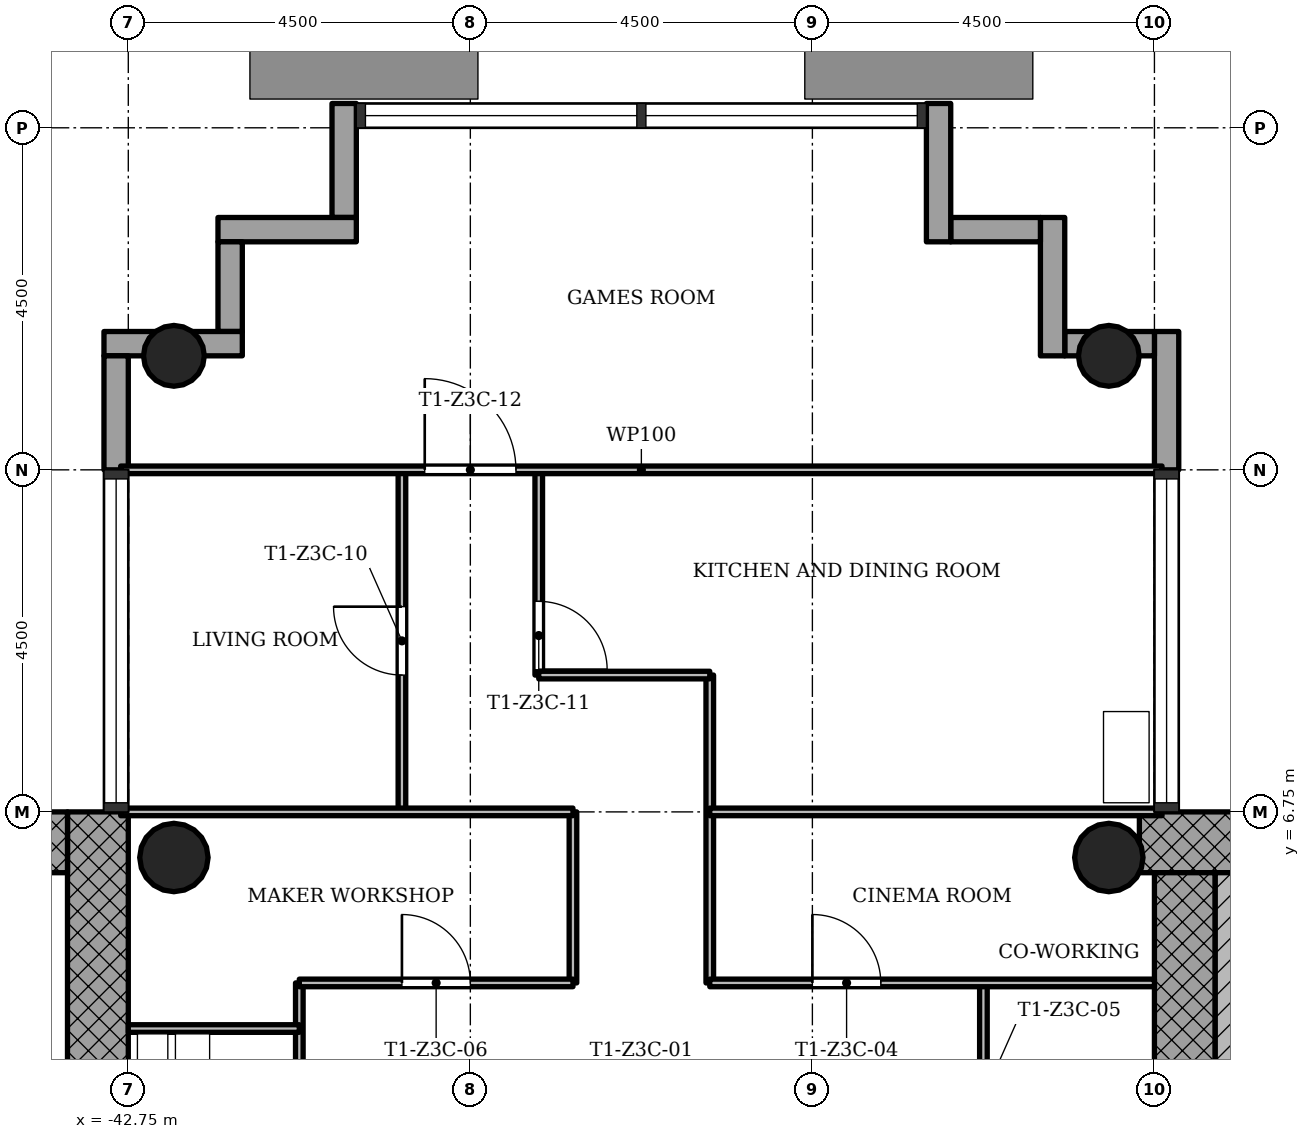
"""IFC4 building model, lengths in metres.
Left out: names, types, materials, properties, quantities, classifications, styles, units other than length and angle.
Written with IfcOpenShell. Run it as: python <this file> out.ifc"""

import sys

from ifc_helpers import new_model, si_unit, direction, frame, frame_2d, origin, origin_2d, place, context, subcontext, project, spatial, rectangle, hollow_circle, extrude, element, fill, save


model = new_model("IFC4")
c1 = context("Model", 3, precision=1e-05, world=origin(), true_north=direction((0.0, 1.0)))
c2 = subcontext(c1, "Body", "Model", "MODEL_VIEW")
j1 = project(units=[si_unit("LENGTHUNIT", "METRE"), si_unit("PLANEANGLEUNIT", "RADIAN")], contexts=[c1])
p1 = place(None, origin())
s1 = spatial("IfcSite", under=j1, at=p1, CompositionType="ELEMENT")
p2 = place(p1, origin())
s2 = spatial("IfcBuilding", under=s1, at=p2, CompositionType="ELEMENT")
p3 = place(p2, frame((0.0, 0.0, 157.5)))
s3 = spatial("IfcBuildingStorey", under=s2, at=p3, CompositionType="ELEMENT", Elevation=157.5)
p4 = place(p3, frame((-20.652, 6.35, 0.0), z_axis=(0.0, 0.0, 1.0), x_axis=(-1.0, 0.0, 0.0)))
e1 = element("IfcWall", 1, at=p4, inside=s3, PredefinedType="SHEAR", context=c2, shape_type="SweptSolid", body=[
    extrude(rectangle(XDim=8.796, YDim=0.8, at=frame_2d((4.398, 0.0))), origin(), (0.0, 0.0, 1.0), 3.4),
])
p5 = place(p3, frame((-28.85, 5.95, 0.0), z_axis=(0.0, 0.0, 1.0), x_axis=(0.0, -1.0, 0.0)))
e2 = element("IfcWall", 2, at=p5, inside=s3, PredefinedType="SHEAR", context=c2, shape_type="SweptSolid", body=[
    extrude(rectangle(XDim=12.7, YDim=0.8, at=frame_2d((6.35, 0.0))), origin(), (0.0, 0.0, 1.0), 3.4),
])
p6 = place(p5, frame((5.05, 0.0, 0.0)))
e3 = element("IfcOpeningElement", 3, at=p6, cuts=e2, PredefinedType="OPENING", context=c2, shape_type="SweptSolid", body=[
    extrude(rectangle(XDim=1.8, YDim=2.1, at=frame_2d((0.9, 1.05))), frame((0.0, 0.41, 0.0), z_axis=(0.0, -1.0, 0.0), x_axis=(1.0, 0.0, 0.0)), (0.0, 0.0, 1.0), 0.82),
])
p7 = place(p3, frame((-43.15, -5.95, 0.0), z_axis=(0.0, 0.0, 1.0), x_axis=(0.0, 1.0, 0.0)))
e4 = element("IfcWall", 4, at=p7, inside=s3, PredefinedType="SHEAR", context=c2, shape_type="SweptSolid", body=[
    extrude(rectangle(XDim=12.7, YDim=0.8, at=frame_2d((6.35, 0.0))), origin(), (0.0, 0.0, 1.0), 3.4),
])
p8 = place(p7, frame((5.05, 0.0, 0.0)))
e5 = element("IfcOpeningElement", 5, at=p8, cuts=e4, PredefinedType="OPENING", context=c2, shape_type="SweptSolid", body=[
    extrude(rectangle(XDim=1.8, YDim=2.1, at=frame_2d((0.9, 1.05))), frame((0.0, 0.41, 0.0), z_axis=(0.0, -1.0, 0.0), x_axis=(1.0, 0.0, 0.0)), (0.0, 0.0, 1.0), 0.82),
])
p9 = place(p3, frame((-43.55, 6.35, 0.0), z_axis=(0.0, 0.0, 1.0), x_axis=(-1.0, 0.0, 0.0)))
e6 = element("IfcWall", 6, at=p9, inside=s3, PredefinedType="SHEAR", context=c2, shape_type="SweptSolid", body=[
    extrude(rectangle(XDim=8.2, YDim=0.8, at=frame_2d((4.1, 0.0))), origin(), (0.0, 0.0, 1.0), 3.4),
])
for number, where, z_axis, x_axis in (
    (7, (-29.85, 12.75, 0.0), (0.0, 0.0, 1.0), (1.0, 0.0, 0.0)),
    (8, (-42.15, 12.75, 0.0), (0.0, 0.0, 1.0), (1.0, 0.0, 0.0)),
):
    element("IfcColumn", number, at=place(p3, frame(where, z_axis=z_axis, x_axis=x_axis)), inside=s3, PredefinedType="COLUMN", context=c2, shape_type="SweptSolid", body=[
        extrude(hollow_circle(Radius=0.4, WallThickness=0.028, at=origin_2d()), origin(), (0.0, 0.0, 1.0), 3.4),
    ])
for number, where, z_axis, x_axis in (
    (9, (-29.85, 6.15, 0.0), (0.0, 0.0, 1.0), (1.0, 0.0, 0.0)),
    (10, (-42.15, 6.15, 0.0), (0.0, 0.0, 1.0), (1.0, 0.0, 0.0)),
):
    element("IfcColumn", number, at=place(p3, frame(where, z_axis=z_axis, x_axis=x_axis)), inside=s3, PredefinedType="COLUMN", context=c2, shape_type="SweptSolid", body=[
        extrude(hollow_circle(Radius=0.45, WallThickness=0.032, at=origin_2d()), origin(), (0.0, 0.0, 1.0), 3.4),
    ])
p10 = place(p3, frame((-29.09, 11.25, -0.3), z_axis=(0.0, 0.0, 1.0), x_axis=(0.0, 1.0, 0.0)))
e11 = element("IfcWall", 11, at=p10, inside=s3, PredefinedType="STANDARD", context=c2, shape_type="SweptSolid", body=[
    extrude(rectangle(XDim=1.82, YDim=0.32, at=frame_2d((0.91, 0.0))), origin(), (0.0, 0.0, 1.0), 3.4),
])
p11 = place(p3, frame((-29.25, 12.91, -0.3), z_axis=(0.0, 0.0, 1.0), x_axis=(-1.0, 0.0, 0.0)))
e12 = element("IfcWall", 12, at=p11, inside=s3, PredefinedType="STANDARD", context=c2, shape_type="SweptSolid", body=[
    extrude(rectangle(XDim=1.18, YDim=0.32, at=frame_2d((0.59, 0.0))), origin(), (0.0, 0.0, 1.0), 3.4),
])
p12 = place(p3, frame((-30.59, 12.75, -0.3), z_axis=(0.0, 0.0, 1.0), x_axis=(0.0, 1.0, 0.0)))
e13 = element("IfcWall", 13, at=p12, inside=s3, PredefinedType="STANDARD", context=c2, shape_type="SweptSolid", body=[
    extrude(rectangle(XDim=1.82, YDim=0.32, at=frame_2d((0.91, 0.0))), origin(), (0.0, 0.0, 1.0), 3.4),
])
p13 = place(p3, frame((-30.75, 14.41, -0.3), z_axis=(0.0, 0.0, 1.0), x_axis=(-1.0, 0.0, 0.0)))
e14 = element("IfcWall", 14, at=p13, inside=s3, PredefinedType="STANDARD", context=c2, shape_type="SweptSolid", body=[
    extrude(rectangle(XDim=1.18, YDim=0.32, at=frame_2d((0.59, 0.0))), origin(), (0.0, 0.0, 1.0), 3.4),
])
p14 = place(p3, frame((-32.09, 14.25, -0.3), z_axis=(0.0, 0.0, 1.0), x_axis=(0.0, 1.0, 0.0)))
e15 = element("IfcWall", 15, at=p14, inside=s3, PredefinedType="STANDARD", context=c2, shape_type="SweptSolid", body=[
    extrude(rectangle(XDim=1.82, YDim=0.32, at=frame_2d((0.91, 0.0))), origin(), (0.0, 0.0, 1.0), 3.4),
])
p15 = place(p3, frame((-39.91, 16.07, -0.3), z_axis=(0.0, 0.0, 1.0), x_axis=(0.0, -1.0, 0.0)))
e16 = element("IfcWall", 16, at=p15, inside=s3, PredefinedType="STANDARD", context=c2, shape_type="SweptSolid", body=[
    extrude(rectangle(XDim=1.5, YDim=0.32, at=frame_2d((0.75, 0.0))), origin(), (0.0, 0.0, 1.0), 3.4),
])
p16 = place(p3, frame((-39.75, 14.41, -0.3), z_axis=(0.0, 0.0, 1.0), x_axis=(-1.0, 0.0, 0.0)))
e17 = element("IfcWall", 17, at=p16, inside=s3, PredefinedType="STANDARD", context=c2, shape_type="SweptSolid", body=[
    extrude(rectangle(XDim=1.82, YDim=0.32, at=frame_2d((0.91, 0.0))), origin(), (0.0, 0.0, 1.0), 3.4),
])
p17 = place(p3, frame((-41.41, 14.25, -0.3), z_axis=(0.0, 0.0, 1.0), x_axis=(0.0, -1.0, 0.0)))
e18 = element("IfcWall", 18, at=p17, inside=s3, PredefinedType="STANDARD", context=c2, shape_type="SweptSolid", body=[
    extrude(rectangle(XDim=1.18, YDim=0.32, at=frame_2d((0.59, 0.0))), origin(), (0.0, 0.0, 1.0), 3.4),
])
p18 = place(p3, frame((-41.25, 12.91, -0.3), z_axis=(0.0, 0.0, 1.0), x_axis=(-1.0, 0.0, 0.0)))
e19 = element("IfcWall", 19, at=p18, inside=s3, PredefinedType="STANDARD", context=c2, shape_type="SweptSolid", body=[
    extrude(rectangle(XDim=1.82, YDim=0.32, at=frame_2d((0.91, 0.0))), origin(), (0.0, 0.0, 1.0), 3.4),
])
p19 = place(p3, frame((-42.91, 12.75, -0.3), z_axis=(0.0, 0.0, 1.0), x_axis=(0.0, -1.0, 0.0)))
e20 = element("IfcWall", 20, at=p19, inside=s3, PredefinedType="STANDARD", context=c2, shape_type="SweptSolid", body=[
    extrude(rectangle(XDim=1.5, YDim=0.32, at=frame_2d((0.75, 0.0))), origin(), (0.0, 0.0, 1.0), 3.4),
])
p20 = place(p3, frame((-40.5, 1.5, 0.0), z_axis=(0.0, 0.0, 1.0), x_axis=(0.0, 1.0, 0.0)))
e21 = element("IfcWall", 21, at=p20, inside=s3, PredefinedType="PARTITIONING", context=c2, shape_type="SweptSolid", body=[
    extrude(rectangle(XDim=3.0, YDim=0.1, at=frame_2d((1.5, 0.0))), origin(), (0.0, 0.0, 1.0), 3.0),
])
p21 = place(p3, frame((-39.15, 6.75, 0.0), z_axis=(0.0, 0.0, 1.0), x_axis=(0.0, 1.0, 0.0)))
e22 = element("IfcWall", 22, at=p21, inside=s3, PredefinedType="PARTITIONING", context=c2, shape_type="SweptSolid", body=[
    extrude(rectangle(XDim=4.5, YDim=0.1, at=frame_2d((2.25, 0.0))), origin(), (0.0, 0.0, 1.0), 3.0),
])
p22 = place(p21, frame((1.8, 0.0, 0.0)))
e23 = element("IfcOpeningElement", 23, at=p22, cuts=e22, PredefinedType="OPENING", context=c2, shape_type="SweptSolid", body=[
    extrude(rectangle(XDim=0.9, YDim=2.1, at=frame_2d((0.45, 1.05))), frame((0.0, 0.06, 0.0), z_axis=(0.0, -1.0, 0.0), x_axis=(1.0, 0.0, 0.0)), (0.0, 0.0, 1.0), 0.12),
])
p23 = place(p3, frame((-37.35, 8.55, 0.0), z_axis=(0.0, 0.0, 1.0), x_axis=(0.0, 1.0, 0.0)))
e24 = element("IfcWall", 24, at=p23, inside=s3, PredefinedType="PARTITIONING", context=c2, shape_type="SweptSolid", body=[
    extrude(rectangle(XDim=2.7, YDim=0.1, at=frame_2d((1.35, 0.0))), origin(), (0.0, 0.0, 1.0), 3.0),
])
p24 = place(p23, frame((0.07, 0.0, 0.0)))
e25 = element("IfcOpeningElement", 25, at=p24, cuts=e24, PredefinedType="OPENING", context=c2, shape_type="SweptSolid", body=[
    extrude(rectangle(XDim=0.9, YDim=2.1, at=frame_2d((0.45, 1.05))), frame((0.0, 0.06, 0.0), z_axis=(0.0, -1.0, 0.0), x_axis=(1.0, 0.0, 0.0)), (0.0, 0.0, 1.0), 0.12),
])
p25 = place(p3, frame((-36.9, 4.5, 0.0), z_axis=(0.0, 0.0, 1.0), x_axis=(0.0, 1.0, 0.0)))
e26 = element("IfcWall", 26, at=p25, inside=s3, PredefinedType="PARTITIONING", context=c2, shape_type="SweptSolid", body=[
    extrude(rectangle(XDim=2.25, YDim=0.1, at=frame_2d((1.125, 0.0))), origin(), (0.0, 0.0, 1.0), 3.0),
])
p26 = place(p3, frame((-35.1, 4.5, 0.0), z_axis=(0.0, 0.0, 1.0), x_axis=(0.0, 1.0, 0.0)))
e27 = element("IfcWall", 27, at=p26, inside=s3, PredefinedType="PARTITIONING", context=c2, shape_type="SweptSolid", body=[
    extrude(rectangle(XDim=4.05, YDim=0.1, at=frame_2d((2.025, 0.0))), origin(), (0.0, 0.0, 1.0), 3.0),
])
p27 = place(p3, frame((-31.5, 1.5, 0.0), z_axis=(0.0, 0.0, 1.0), x_axis=(0.0, 1.0, 0.0)))
e28 = element("IfcWall", 28, at=p27, inside=s3, PredefinedType="PARTITIONING", context=c2, shape_type="SweptSolid", body=[
    extrude(rectangle(XDim=3.0, YDim=0.1, at=frame_2d((1.5, 0.0))), origin(), (0.0, 0.0, 1.0), 3.0),
])
p28 = place(p27, frame((1.05, 0.0, 0.0)))
e29 = element("IfcOpeningElement", 29, at=p28, cuts=e28, PredefinedType="OPENING", context=c2, shape_type="SweptSolid", body=[
    extrude(rectangle(XDim=0.9, YDim=2.1, at=frame_2d((0.45, 1.05))), frame((0.0, 0.06, 0.0), z_axis=(0.0, -1.0, 0.0), x_axis=(1.0, 0.0, 0.0)), (0.0, 0.0, 1.0), 0.12),
])
p29 = place(p3, frame((-42.75, 3.9, 0.0), z_axis=(0.0, 0.0, 1.0), x_axis=(1.0, 0.0, 0.0)))
e30 = element("IfcWall", 30, at=p29, inside=s3, PredefinedType="PARTITIONING", context=c2, shape_type="SweptSolid", body=[
    extrude(rectangle(XDim=2.25, YDim=0.1, at=frame_2d((1.125, 0.0))), origin(), (0.0, 0.0, 1.0), 3.0),
])
p30 = place(p3, frame((-40.5, 4.5, 0.0), z_axis=(0.0, 0.0, 1.0), x_axis=(1.0, 0.0, 0.0)))
e31 = element("IfcWall", 31, at=p30, inside=s3, PredefinedType="PARTITIONING", context=c2, shape_type="SweptSolid", body=[
    extrude(rectangle(XDim=3.6, YDim=0.1, at=frame_2d((1.8, 0.0))), origin(), (0.0, 0.0, 1.0), 3.0),
])
p31 = place(p30, frame((1.35, 0.0, 0.0)))
e32 = element("IfcOpeningElement", 32, at=p31, cuts=e31, PredefinedType="OPENING", context=c2, shape_type="SweptSolid", body=[
    extrude(rectangle(XDim=0.9, YDim=2.1, at=frame_2d((0.45, 1.05))), frame((0.0, 0.06, 0.0), z_axis=(0.0, -1.0, 0.0), x_axis=(1.0, 0.0, 0.0)), (0.0, 0.0, 1.0), 0.12),
])
p32 = place(p3, frame((-35.1, 4.5, 0.0), z_axis=(0.0, 0.0, 1.0), x_axis=(1.0, 0.0, 0.0)))
e33 = element("IfcWall", 33, at=p32, inside=s3, PredefinedType="PARTITIONING", context=c2, shape_type="SweptSolid", body=[
    extrude(rectangle(XDim=5.85, YDim=0.1, at=frame_2d((2.925, 0.0))), origin(), (0.0, 0.0, 1.0), 3.0),
])
p33 = place(p32, frame((1.35, 0.0, 0.0)))
e34 = element("IfcOpeningElement", 34, at=p33, cuts=e33, PredefinedType="OPENING", context=c2, shape_type="SweptSolid", body=[
    extrude(rectangle(XDim=0.9, YDim=2.1, at=frame_2d((0.45, 1.05))), frame((0.0, 0.06, 0.0), z_axis=(0.0, -1.0, 0.0), x_axis=(1.0, 0.0, 0.0)), (0.0, 0.0, 1.0), 0.12),
])
for number, where, z_axis, x_axis in (
    (35, (-42.85, 6.75, 0.0), (0.0, 0.0, 1.0), (1.0, 0.0, 0.0)),
    (36, (-35.1, 6.75, 0.0), (0.0, 0.0, 1.0), (1.0, 0.0, 0.0)),
):
    element("IfcWall", number, at=place(p3, frame(where, z_axis=z_axis, x_axis=x_axis)), inside=s3, PredefinedType="PARTITIONING", context=c2, shape_type="SweptSolid", body=[
        extrude(rectangle(XDim=5.95, YDim=0.1, at=frame_2d((2.975, 0.0))), origin(), (0.0, 0.0, 1.0), 3.0),
    ])
p34 = place(p3, frame((-37.35, 8.55, 0.0), z_axis=(0.0, 0.0, 1.0), x_axis=(1.0, 0.0, 0.0)))
e37 = element("IfcWall", 37, at=p34, inside=s3, PredefinedType="PARTITIONING", context=c2, shape_type="SweptSolid", body=[
    extrude(rectangle(XDim=2.25, YDim=0.1, at=frame_2d((1.125, 0.0))), origin(), (0.0, 0.0, 1.0), 3.0),
])
p35 = place(p3, frame((-42.85, 11.25, 0.0), z_axis=(0.0, 0.0, 1.0), x_axis=(1.0, 0.0, 0.0)))
e38 = element("IfcWall", 38, at=p35, inside=s3, PredefinedType="PARTITIONING", context=c2, shape_type="SweptSolid", body=[
    extrude(rectangle(XDim=13.7, YDim=0.1, at=frame_2d((6.85, 0.0))), origin(), (0.0, 0.0, 1.0), 3.0),
])
p36 = place(p35, frame((4.0, 0.0, 0.0)))
e39 = element("IfcOpeningElement", 39, at=p36, cuts=e38, PredefinedType="OPENING", context=c2, shape_type="SweptSolid", body=[
    extrude(rectangle(XDim=1.2, YDim=2.1, at=frame_2d((0.6, 1.05))), frame((0.0, 0.06, 0.0), z_axis=(0.0, -1.0, 0.0), x_axis=(1.0, 0.0, 0.0)), (0.0, 0.0, 1.0), 0.12),
])
p37 = place(p3, frame((-28.25, 1.85, 0.0), z_axis=(0.0, 0.0, 1.0), x_axis=(0.0, 1.0, 0.0)))
e40 = element("IfcWall", 40, at=p37, inside=s3, PredefinedType="SHEAR", context=c2, shape_type="SweptSolid", body=[
    extrude(rectangle(XDim=4.1, YDim=0.4, at=frame_2d((2.05, 0.0))), origin(), (0.0, 0.0, 1.0), 3.4),
])
p38 = place(p33, origin())
e41 = element("IfcDoor", 41, at=p38, inside=s3, OperationType="SINGLE_SWING_RIGHT", PredefinedType="DOOR", context=c2, shape_type="SweptSolid", body=[
    extrude(rectangle(XDim=0.9, YDim=2.1, at=frame_2d((0.45, 1.05))), frame((0.0, 0.025, 0.0), z_axis=(0.0, -1.0, 0.0), x_axis=(1.0, 0.0, 0.0)), (0.0, 0.0, 1.0), 0.05),
])
fill(e34, e41)
p39 = place(p31, origin())
e42 = element("IfcDoor", 42, at=p39, inside=s3, OperationType="SINGLE_SWING_RIGHT", PredefinedType="DOOR", context=c2, shape_type="SweptSolid", body=[
    extrude(rectangle(XDim=0.9, YDim=2.1, at=frame_2d((0.45, 1.05))), frame((0.0, 0.025, 0.0), z_axis=(0.0, -1.0, 0.0), x_axis=(1.0, 0.0, 0.0)), (0.0, 0.0, 1.0), 0.05),
])
fill(e32, e42)
p40 = place(p22, origin())
e43 = element("IfcDoor", 43, at=p40, inside=s3, OperationType="SINGLE_SWING_LEFT", PredefinedType="DOOR", context=c2, shape_type="SweptSolid", body=[
    extrude(rectangle(XDim=0.9, YDim=2.1, at=frame_2d((0.45, 1.05))), frame((0.0, 0.025, 0.0), z_axis=(0.0, -1.0, 0.0), x_axis=(1.0, 0.0, 0.0)), (0.0, 0.0, 1.0), 0.05),
])
fill(e23, e43)
p41 = place(p24, origin())
e44 = element("IfcDoor", 44, at=p41, inside=s3, OperationType="SINGLE_SWING_LEFT", PredefinedType="DOOR", context=c2, shape_type="SweptSolid", body=[
    extrude(rectangle(XDim=0.9, YDim=2.1, at=frame_2d((0.45, 1.05))), frame((0.0, 0.025, 0.0), z_axis=(0.0, -1.0, 0.0), x_axis=(1.0, 0.0, 0.0)), (0.0, 0.0, 1.0), 0.05),
])
fill(e25, e44)
p42 = place(p36, origin())
e45 = element("IfcDoor", 45, at=p42, inside=s3, OperationType="SINGLE_SWING_RIGHT", PredefinedType="DOOR", context=c2, shape_type="SweptSolid", body=[
    extrude(rectangle(XDim=1.2, YDim=2.1, at=frame_2d((0.6, 1.05))), frame((0.0, 0.025, 0.0), z_axis=(0.0, -1.0, 0.0), x_axis=(1.0, 0.0, 0.0)), (0.0, 0.0, 1.0), 0.05),
])
fill(e39, e45)
save(model, sys.argv[1])
